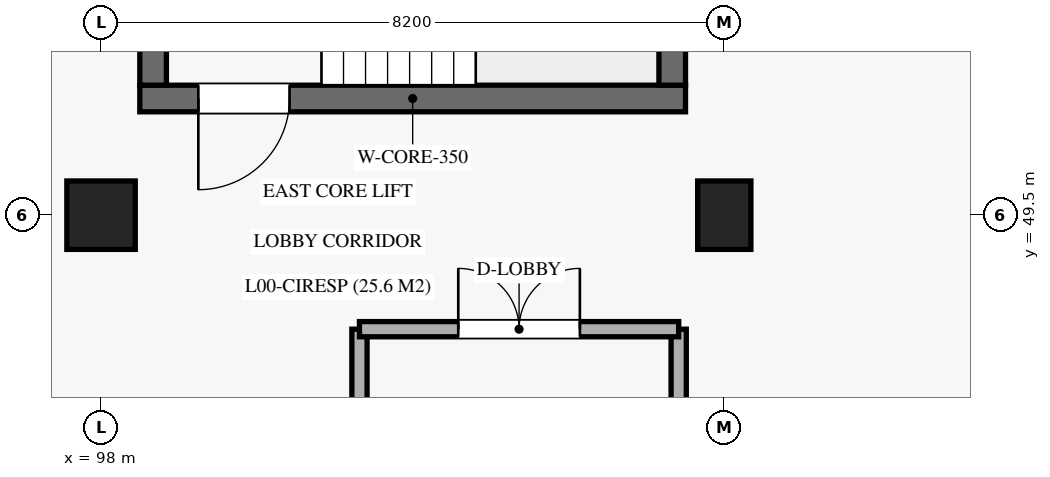
"""IFC4 building model, lengths in metres.
Left out: names, types, materials, properties, quantities, classifications, styles, units other than length and angle.
Written with IfcOpenShell. Run it as: python <this file> out.ifc"""

import sys

from ifc_helpers import new_model, si_unit, direction, frame, frame_2d, origin, origin_2d, place, context, subcontext, project, spatial, rectangle, extrude, element, fill, save


model = new_model("IFC4")
c1 = context("Model", 3, precision=1e-05, world=origin(), true_north=direction((0.0, 1.0)))
c2 = subcontext(c1, "Body", "Model", "MODEL_VIEW")
j1 = project(units=[si_unit("LENGTHUNIT", "METRE"), si_unit("PLANEANGLEUNIT", "RADIAN")], contexts=[c1])
p1 = place(None, origin())
s1 = spatial("IfcSite", under=j1, at=p1, CompositionType="ELEMENT")
p2 = place(p1, origin())
s2 = spatial("IfcBuilding", under=s1, at=p2, CompositionType="ELEMENT")
p3 = place(p2, origin())
s3 = spatial("IfcBuildingStorey", under=s2, at=p3, CompositionType="ELEMENT", Elevation=0.0)
p4 = place(p3, frame((98.0, 49.5, 0.0), z_axis=(0.0, 0.0, 1.0), x_axis=(1.0, 0.0, 0.0)))
e1 = element("IfcColumn", 1, at=p4, inside=s3, PredefinedType="COLUMN", context=c2, shape_type="SweptSolid", body=[
    extrude(rectangle(XDim=0.9, YDim=0.9, at=origin_2d()), origin(), (0.0, 0.0, 1.0), 5.44),
])
p5 = place(p3, frame((106.2, 49.5, 0.0), z_axis=(0.0, 0.0, 1.0), x_axis=(1.0, 0.0, 0.0)))
e2 = element("IfcColumn", 2, at=p5, inside=s3, PredefinedType="COLUMN", context=c2, shape_type="SweptSolid", body=[
    extrude(rectangle(XDim=0.7, YDim=0.9, at=origin_2d()), origin(), (0.0, 0.0, 1.0), 5.44),
])
p6 = place(p3, frame((98.51, 51.035, 0.0), z_axis=(0.0, 0.0, 1.0), x_axis=(1.0, 0.0, 0.0)))
e3 = element("IfcWall", 3, at=p6, inside=s3, PredefinedType="SHEAR", context=c2, shape_type="SweptSolid", body=[
    extrude(rectangle(XDim=7.18, YDim=0.35, at=frame_2d((3.59, 0.0))), origin(), (0.0, 0.0, 1.0), 5.18),
])
p7 = place(p6, frame((0.77, 0.0, 0.0)))
e4 = element("IfcOpeningElement", 4, at=p7, cuts=e3, PredefinedType="OPENING", context=c2, shape_type="SweptSolid", body=[
    extrude(rectangle(XDim=1.2, YDim=2.2, at=frame_2d((0.6, 1.1))), frame((0.0, 0.185, 0.0), z_axis=(0.0, -1.0, 0.0), x_axis=(1.0, 0.0, 0.0)), (0.0, 0.0, 1.0), 0.37),
])
for number, where, z_axis, x_axis in (
    (5, (98.685, 51.21, 0.0), (0.0, 0.0, 1.0), (0.0, 1.0, 0.0)),
    (6, (105.515, 51.21, 0.0), (0.0, 0.0, 1.0), (0.0, 1.0, 0.0)),
):
    element("IfcWall", number, at=place(p3, frame(where, z_axis=z_axis, x_axis=x_axis)), inside=s3, PredefinedType="SHEAR", context=c2, shape_type="SweptSolid", body=[
        extrude(rectangle(XDim=6.48, YDim=0.35, at=frame_2d((3.24, 0.0))), origin(), (0.0, 0.0, 1.0), 5.18),
    ])
p8 = place(p3, frame((101.4, 45.6, 0.0), z_axis=(0.0, 0.0, 1.0), x_axis=(0.0, 1.0, 0.0)))
e7 = element("IfcWall", 7, at=p8, inside=s3, PredefinedType="SOLIDWALL", context=c2, shape_type="SweptSolid", body=[
    extrude(rectangle(XDim=2.4, YDim=0.2, at=frame_2d((1.2, 0.0))), origin(), (0.0, 0.0, 1.0), 4.3),
])
p9 = place(p3, frame((105.6, 40.3, 0.0), z_axis=(0.0, 0.0, 1.0), x_axis=(0.0, 1.0, 0.0)))
e8 = element("IfcWall", 8, at=p9, inside=s3, PredefinedType="SOLIDWALL", context=c2, shape_type="SweptSolid", body=[
    extrude(rectangle(XDim=7.7, YDim=0.2, at=frame_2d((3.85, 0.0))), origin(), (0.0, 0.0, 1.0), 4.3),
])
p10 = place(p3, frame((101.4, 48.0, 0.0), z_axis=(0.0, 0.0, 1.0), x_axis=(1.0, 0.0, 0.0)))
e9 = element("IfcWall", 9, at=p10, inside=s3, PredefinedType="SOLIDWALL", context=c2, shape_type="SweptSolid", body=[
    extrude(rectangle(XDim=4.2, YDim=0.2, at=frame_2d((2.1, 0.0))), origin(), (0.0, 0.0, 1.0), 4.3),
])
p11 = place(p10, frame((1.3, 0.0, 0.0)))
e10 = element("IfcOpeningElement", 10, at=p11, cuts=e9, PredefinedType="OPENING", context=c2, shape_type="SweptSolid", body=[
    extrude(rectangle(XDim=1.6, YDim=2.2, at=frame_2d((0.8, 1.1))), frame((0.0, 0.11, 0.0), z_axis=(0.0, -1.0, 0.0), x_axis=(1.0, 0.0, 0.0)), (0.0, 0.0, 1.0), 0.22),
])
p12 = place(p7, frame((1.2, 0.0, 0.0), z_axis=(0.0, 0.0, 1.0), x_axis=(-1.0, 0.0, 0.0)))
e11 = element("IfcDoor", 11, at=p12, inside=s3, OperationType="SINGLE_SWING_RIGHT", PredefinedType="DOOR", context=c2, shape_type="SweptSolid", body=[
    extrude(rectangle(XDim=1.2, YDim=2.2, at=frame_2d((0.6, 1.1))), frame((0.0, 0.025, 0.0), z_axis=(0.0, -1.0, 0.0), x_axis=(1.0, 0.0, 0.0)), (0.0, 0.0, 1.0), 0.05),
])
fill(e4, e11)
p13 = place(p11, origin())
e12 = element("IfcDoor", 12, at=p13, inside=s3, OperationType="DOUBLE_DOOR_SINGLE_SWING", PredefinedType="DOOR", context=c2, shape_type="SweptSolid", body=[
    extrude(rectangle(XDim=1.6, YDim=2.2, at=frame_2d((0.8, 1.1))), frame((0.0, 0.025, 0.0), z_axis=(0.0, -1.0, 0.0), x_axis=(1.0, 0.0, 0.0)), (0.0, 0.0, 1.0), 0.05),
])
fill(e10, e12)
save(model, sys.argv[1])
